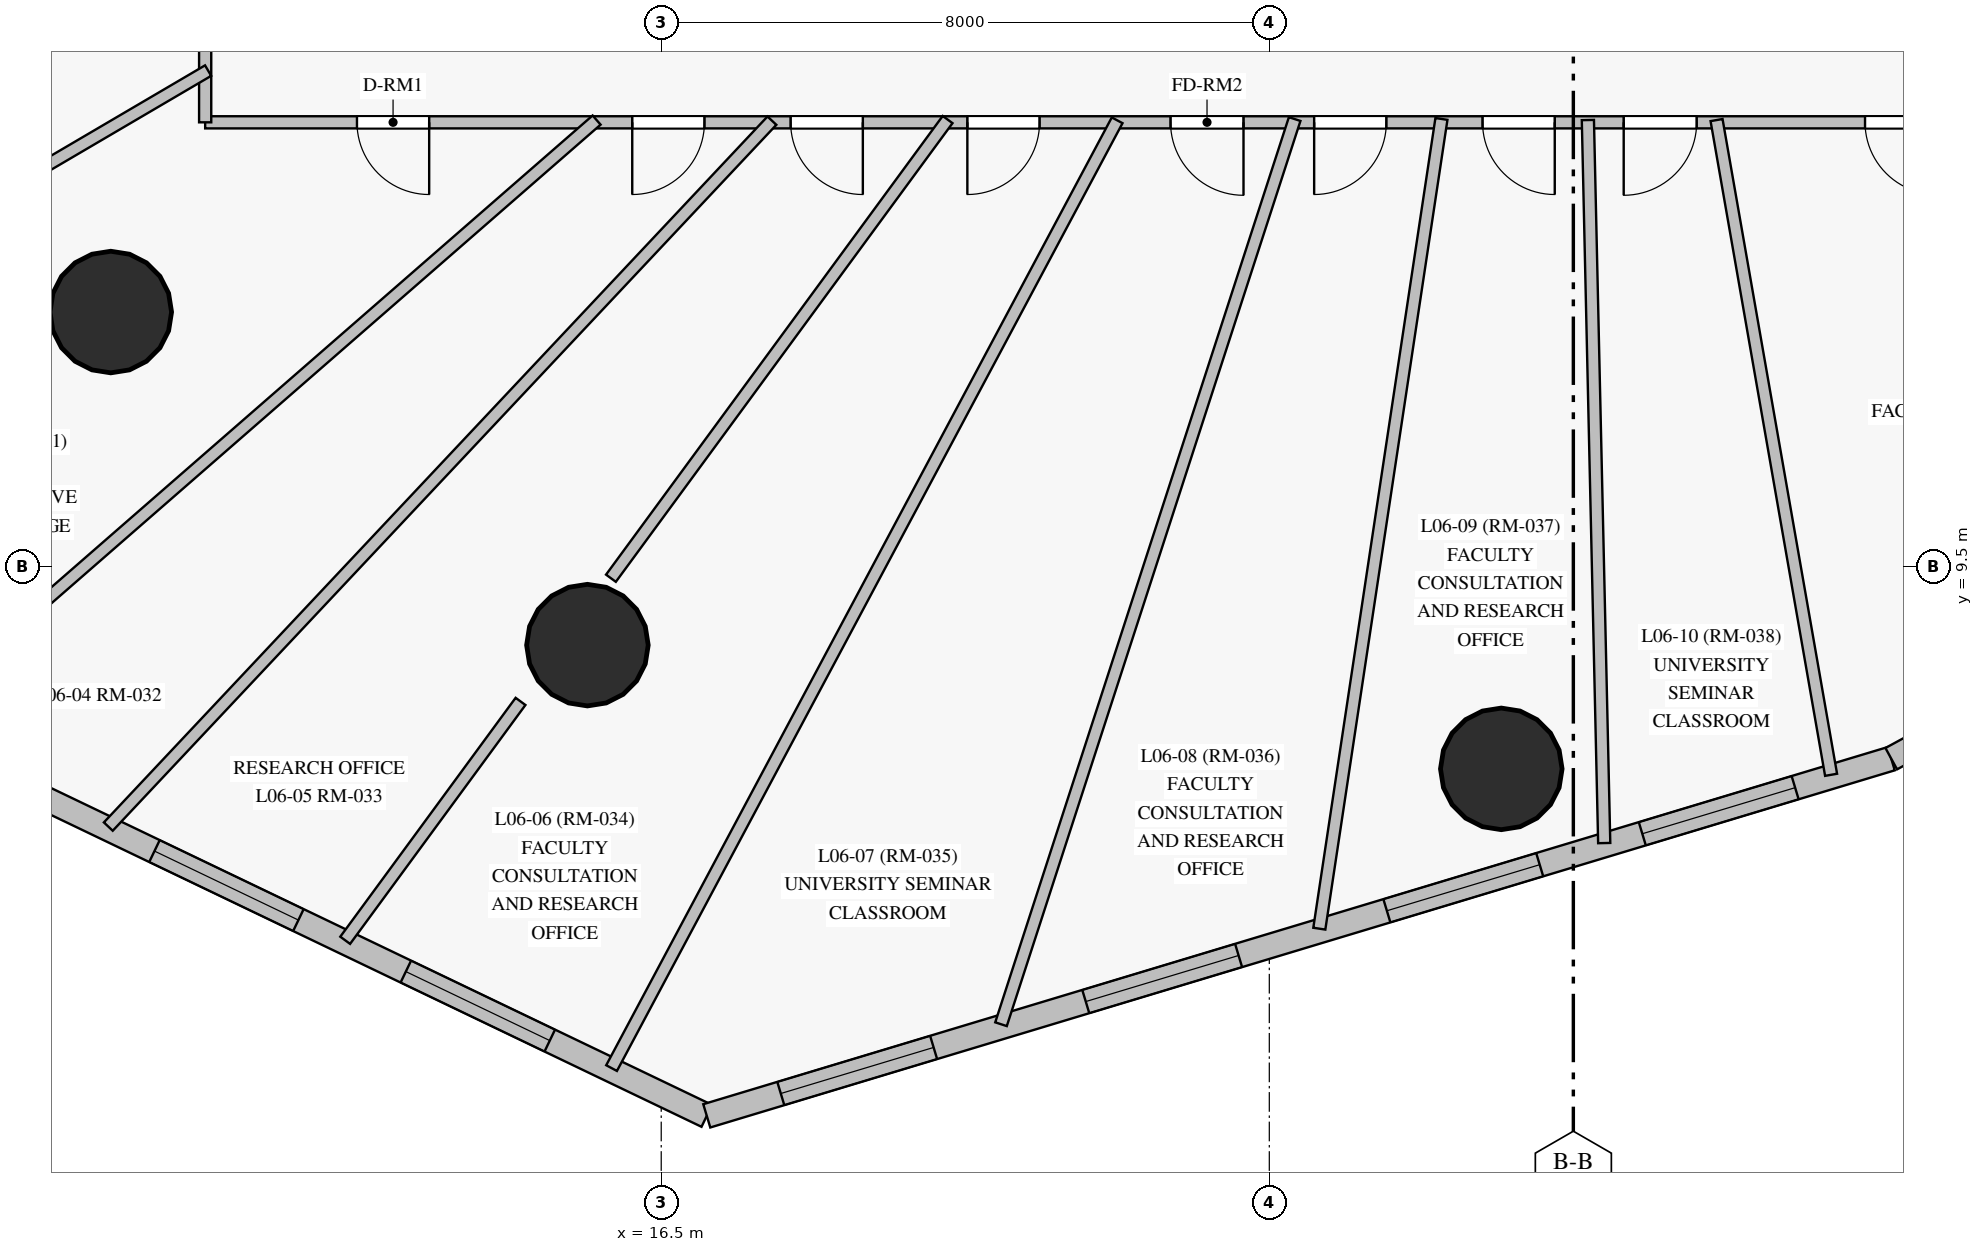
"""IFC4 building model, lengths in metres.
Left out: names, types, materials, properties, quantities, classifications, styles, units other than length and angle.
Written with IfcOpenShell. Run it as: python <this file> out.ifc"""

import sys

from ifc_helpers import new_model, si_unit, direction, frame, frame_2d, origin, origin_with_axes, origin_2d, place, context, subcontext, project, spatial, rectangle, circle, extrude, source, transform, mapped, element, fill, save


model = new_model("IFC4")
c1 = context("Model", 3, precision=1e-05, world=origin(), true_north=direction((0.0, 1.0)))
c2 = subcontext(c1, "Body", "Model", "MODEL_VIEW")
j1 = project(units=[si_unit("LENGTHUNIT", "METRE"), si_unit("PLANEANGLEUNIT", "RADIAN")], contexts=[c1])
p1 = place(None, origin())
s1 = spatial("IfcSite", under=j1, at=p1, CompositionType="ELEMENT")
p2 = place(p1, origin())
s2 = spatial("IfcBuilding", under=s1, at=p2, CompositionType="ELEMENT")
p3 = place(p2, frame((0.0, 0.0, 26.5)))
s3 = spatial("IfcBuildingStorey", under=s2, at=p3, CompositionType="ELEMENT", Elevation=26.5)
m1 = source(origin_with_axes(), c2, "Body", "SweptSolid", [
    extrude(circle(Radius=0.8, at=origin_2d()), origin(), (0.0, 0.0, 1.0), 3.6),
])
for number, where, z_axis, x_axis in (
    (1, (9.258, 12.854, 0.0), (0.0, 0.0, 1.0), (1.0, 0.0, 0.0)),
    (2, (15.529, 8.472, 0.0), (0.0, 0.0, 1.0), (1.0, 0.0, 0.0)),
    (3, (27.552, 6.844, 0.0), (0.0, 0.0, 1.0), (1.0, 0.0, 0.0)),
):
    element("IfcColumn", number, at=place(p3, frame(where, z_axis=z_axis, x_axis=x_axis)), inside=s3, PredefinedType="COLUMN", context=c2, shape_type="MappedRepresentation", body=[
        mapped(m1, transform((0.0, 0.0, 0.0), scale=1.0)),
    ])
p4 = place(p3, frame((7.334, 6.961, 0.0), z_axis=(0.0, 0.0, 1.0), x_axis=(0.901738594253, -0.432281745664, 0.0)))
e4 = element("IfcWall", 4, at=p4, inside=s3, PredefinedType="SOLIDWALL", context=c2, shape_type="SweptSolid", body=[
    extrude(rectangle(XDim=10.83, YDim=0.32, at=frame_2d((5.415, 0.0))), origin(), (0.0, 0.0, 1.0), 3.35),
])
p5 = place(p4, frame((2.771, 0.0, 0.85)))
e5 = element("IfcOpeningElement", 5, at=p5, cuts=e4, PredefinedType="OPENING", context=c2, shape_type="SweptSolid", body=[
    extrude(rectangle(XDim=2.1, YDim=1.95, at=frame_2d((1.05, 0.975))), frame((0.0, 0.17, 0.0), z_axis=(0.0, -1.0, 0.0), x_axis=(1.0, 0.0, 0.0)), (0.0, 0.0, 1.0), 0.34),
])
p6 = place(p4, frame((6.439, 0.0, 0.85)))
e6 = element("IfcOpeningElement", 6, at=p6, cuts=e4, PredefinedType="OPENING", context=c2, shape_type="SweptSolid", body=[
    extrude(rectangle(XDim=2.1, YDim=1.95, at=frame_2d((1.05, 0.975))), frame((0.0, 0.17, 0.0), z_axis=(0.0, -1.0, 0.0), x_axis=(1.0, 0.0, 0.0)), (0.0, 0.0, 1.0), 0.34),
])
p7 = place(p3, frame((17.099, 2.279, 0.0), z_axis=(0.0, 0.0, 1.0), x_axis=(0.957423656835, 0.288686579759, 0.0)))
e7 = element("IfcWall", 7, at=p7, inside=s3, PredefinedType="SOLIDWALL", context=c2, shape_type="SweptSolid", body=[
    extrude(rectangle(XDim=16.276, YDim=0.32, at=frame_2d((8.138, 0.0))), origin(), (0.0, 0.0, 1.0), 3.35),
])
p8 = place(p7, frame((1.017, 0.0, 0.85)))
e8 = element("IfcOpeningElement", 8, at=p8, cuts=e7, PredefinedType="OPENING", context=c2, shape_type="SweptSolid", body=[
    extrude(rectangle(XDim=2.1, YDim=1.95, at=frame_2d((1.05, 0.975))), frame((0.0, 0.17, 0.0), z_axis=(0.0, -1.0, 0.0), x_axis=(1.0, 0.0, 0.0)), (0.0, 0.0, 1.0), 0.34),
])
p9 = place(p7, frame((5.208, 0.0, 0.85)))
e9 = element("IfcOpeningElement", 9, at=p9, cuts=e7, PredefinedType="OPENING", context=c2, shape_type="SweptSolid", body=[
    extrude(rectangle(XDim=2.1, YDim=1.95, at=frame_2d((1.05, 0.975))), frame((0.0, 0.17, 0.0), z_axis=(0.0, -1.0, 0.0), x_axis=(1.0, 0.0, 0.0)), (0.0, 0.0, 1.0), 0.34),
])
p10 = place(p7, frame((9.345, 0.0, 0.85)))
e10 = element("IfcOpeningElement", 10, at=p10, cuts=e7, PredefinedType="OPENING", context=c2, shape_type="SweptSolid", body=[
    extrude(rectangle(XDim=2.1, YDim=1.95, at=frame_2d((1.05, 0.975))), frame((0.0, 0.17, 0.0), z_axis=(0.0, -1.0, 0.0), x_axis=(1.0, 0.0, 0.0)), (0.0, 0.0, 1.0), 0.34),
])
p11 = place(p7, frame((12.855, 0.0, 0.85)))
e11 = element("IfcOpeningElement", 11, at=p11, cuts=e7, PredefinedType="OPENING", context=c2, shape_type="SweptSolid", body=[
    extrude(rectangle(XDim=2.1, YDim=1.95, at=frame_2d((1.05, 0.975))), frame((0.0, 0.17, 0.0), z_axis=(0.0, -1.0, 0.0), x_axis=(1.0, 0.0, 0.0)), (0.0, 0.0, 1.0), 0.34),
])
p12 = place(p3, frame((32.683, 6.978, 0.0), z_axis=(0.0, 0.0, 1.0), x_axis=(0.878311519502, 0.478088772833, 0.0)))
e12 = element("IfcWall", 12, at=p12, inside=s3, PredefinedType="SOLIDWALL", context=c2, shape_type="SweptSolid", body=[
    extrude(rectangle(XDim=11.319, YDim=0.32, at=frame_2d((5.659, 0.0))), origin(), (0.0, 0.0, 1.0), 3.35),
])
p13 = place(p12, frame((1.178, 0.0, 0.85)))
e13 = element("IfcOpeningElement", 13, at=p13, cuts=e12, PredefinedType="OPENING", context=c2, shape_type="SweptSolid", body=[
    extrude(rectangle(XDim=2.1, YDim=1.95, at=frame_2d((1.05, 0.975))), frame((0.0, 0.17, 0.0), z_axis=(0.0, -1.0, 0.0), x_axis=(1.0, 0.0, 0.0)), (0.0, 0.0, 1.0), 0.34),
])
p14 = place(p12, frame((4.874, 0.0, 0.85)))
e14 = element("IfcOpeningElement", 14, at=p14, cuts=e12, PredefinedType="OPENING", context=c2, shape_type="SweptSolid", body=[
    extrude(rectangle(XDim=2.1, YDim=1.95, at=frame_2d((1.05, 0.975))), frame((0.0, 0.17, 0.0), z_axis=(0.0, -1.0, 0.0), x_axis=(1.0, 0.0, 0.0)), (0.0, 0.0, 1.0), 0.34),
])
p15 = place(p12, frame((8.625, 0.0, 0.85)))
e15 = element("IfcOpeningElement", 15, at=p15, cuts=e12, PredefinedType="OPENING", context=c2, shape_type="SweptSolid", body=[
    extrude(rectangle(XDim=2.1, YDim=1.95, at=frame_2d((1.05, 0.975))), frame((0.0, 0.17, 0.0), z_axis=(0.0, -1.0, 0.0), x_axis=(1.0, 0.0, 0.0)), (0.0, 0.0, 1.0), 0.34),
])
p16 = place(p3, frame((40.25, 15.35, 0.0), z_axis=(0.0, 0.0, 1.0), x_axis=(-1.0, 0.0, 0.0)))
e16 = element("IfcWall", 16, at=p16, inside=s3, PredefinedType="PARTITIONING", context=c2, shape_type="SweptSolid", body=[
    extrude(rectangle(XDim=29.75, YDim=0.16, at=frame_2d((14.875, 0.0))), origin(), (0.0, 0.0, 1.0), 2.7),
])
p17 = place(p16, frame((26.803, 0.0, 0.0)))
e17 = element("IfcOpeningElement", 17, at=p17, cuts=e16, PredefinedType="OPENING", context=c2, shape_type="SweptSolid", body=[
    extrude(rectangle(XDim=0.95, YDim=2.15, at=frame_2d((0.475, 1.075))), frame((0.0, 0.09, 0.0), z_axis=(0.0, -1.0, 0.0), x_axis=(1.0, 0.0, 0.0)), (0.0, 0.0, 1.0), 0.18),
])
p18 = place(p16, frame((23.181, 0.0, 0.0)))
e18 = element("IfcOpeningElement", 18, at=p18, cuts=e16, PredefinedType="OPENING", context=c2, shape_type="SweptSolid", body=[
    extrude(rectangle(XDim=0.95, YDim=2.15, at=frame_2d((0.475, 1.075))), frame((0.0, 0.09, 0.0), z_axis=(0.0, -1.0, 0.0), x_axis=(1.0, 0.0, 0.0)), (0.0, 0.0, 1.0), 0.18),
])
p19 = place(p16, frame((21.097, 0.0, 0.0)))
e19 = element("IfcOpeningElement", 19, at=p19, cuts=e16, PredefinedType="OPENING", context=c2, shape_type="SweptSolid", body=[
    extrude(rectangle(XDim=0.95, YDim=2.15, at=frame_2d((0.475, 1.075))), frame((0.0, 0.09, 0.0), z_axis=(0.0, -1.0, 0.0), x_axis=(1.0, 0.0, 0.0)), (0.0, 0.0, 1.0), 0.18),
])
p20 = place(p16, frame((18.772, 0.0, 0.0)))
e20 = element("IfcOpeningElement", 20, at=p20, cuts=e16, PredefinedType="OPENING", context=c2, shape_type="SweptSolid", body=[
    extrude(rectangle(XDim=0.95, YDim=2.15, at=frame_2d((0.475, 1.075))), frame((0.0, 0.09, 0.0), z_axis=(0.0, -1.0, 0.0), x_axis=(1.0, 0.0, 0.0)), (0.0, 0.0, 1.0), 0.18),
])
p21 = place(p16, frame((16.089, 0.0, 0.0)))
e21 = element("IfcOpeningElement", 21, at=p21, cuts=e16, PredefinedType="OPENING", context=c2, shape_type="SweptSolid", body=[
    extrude(rectangle(XDim=0.96, YDim=2.15, at=frame_2d((0.48, 1.075))), frame((0.0, 0.09, 0.0), z_axis=(0.0, -1.0, 0.0), x_axis=(1.0, 0.0, 0.0)), (0.0, 0.0, 1.0), 0.18),
])
p22 = place(p16, frame((14.21, 0.0, 0.0)))
e22 = element("IfcOpeningElement", 22, at=p22, cuts=e16, PredefinedType="OPENING", context=c2, shape_type="SweptSolid", body=[
    extrude(rectangle(XDim=0.95, YDim=2.15, at=frame_2d((0.475, 1.075))), frame((0.0, 0.09, 0.0), z_axis=(0.0, -1.0, 0.0), x_axis=(1.0, 0.0, 0.0)), (0.0, 0.0, 1.0), 0.18),
])
p23 = place(p16, frame((11.995, 0.0, 0.0)))
e23 = element("IfcOpeningElement", 23, at=p23, cuts=e16, PredefinedType="OPENING", context=c2, shape_type="SweptSolid", body=[
    extrude(rectangle(XDim=0.95, YDim=2.15, at=frame_2d((0.475, 1.075))), frame((0.0, 0.09, 0.0), z_axis=(0.0, -1.0, 0.0), x_axis=(1.0, 0.0, 0.0)), (0.0, 0.0, 1.0), 0.18),
])
p24 = place(p16, frame((10.127, 0.0, 0.0)))
e24 = element("IfcOpeningElement", 24, at=p24, cuts=e16, PredefinedType="OPENING", context=c2, shape_type="SweptSolid", body=[
    extrude(rectangle(XDim=0.96, YDim=2.15, at=frame_2d((0.48, 1.075))), frame((0.0, 0.09, 0.0), z_axis=(0.0, -1.0, 0.0), x_axis=(1.0, 0.0, 0.0)), (0.0, 0.0, 1.0), 0.18),
])
p25 = place(p16, frame((6.962, 0.0, 0.0)))
e25 = element("IfcOpeningElement", 25, at=p25, cuts=e16, PredefinedType="OPENING", context=c2, shape_type="SweptSolid", body=[
    extrude(rectangle(XDim=0.95, YDim=2.15, at=frame_2d((0.475, 1.075))), frame((0.0, 0.09, 0.0), z_axis=(0.0, -1.0, 0.0), x_axis=(1.0, 0.0, 0.0)), (0.0, 0.0, 1.0), 0.18),
])
p26 = place(p16, frame((1.325, 0.0, 0.0)))
e26 = element("IfcOpeningElement", 26, at=p26, cuts=e16, PredefinedType="OPENING", context=c2, shape_type="SweptSolid", body=[
    extrude(rectangle(XDim=0.95, YDim=2.15, at=frame_2d((0.475, 1.075))), frame((0.0, 0.09, 0.0), z_axis=(0.0, -1.0, 0.0), x_axis=(1.0, 0.0, 0.0)), (0.0, 0.0, 1.0), 0.18),
])
p27 = place(p3, frame((10.5, 15.35, 0.0), z_axis=(0.0, 0.0, 1.0), x_axis=(0.0, 1.0, 0.0)))
e27 = element("IfcWall", 27, at=p27, inside=s3, PredefinedType="PARTITIONING", context=c2, shape_type="SweptSolid", body=[
    extrude(rectangle(XDim=22.3, YDim=0.16, at=frame_2d((11.15, 0.0))), origin(), (0.0, 0.0, 1.0), 2.75),
])
p28 = place(p27, frame((7.33, 0.0, 0.0)))
e28 = element("IfcOpeningElement", 28, at=p28, cuts=e27, PredefinedType="OPENING", context=c2, shape_type="SweptSolid", body=[
    extrude(rectangle(XDim=0.95, YDim=2.15, at=frame_2d((0.475, 1.075))), frame((0.0, 0.09, 0.0), z_axis=(0.0, -1.0, 0.0), x_axis=(1.0, 0.0, 0.0)), (0.0, 0.0, 1.0), 0.18),
])
p29 = place(p27, frame((5.1, 0.0, 0.0)))
e29 = element("IfcOpeningElement", 29, at=p29, cuts=e27, PredefinedType="OPENING", context=c2, shape_type="SweptSolid", body=[
    extrude(rectangle(XDim=0.96, YDim=2.15, at=frame_2d((0.48, 1.075))), frame((0.0, 0.09, 0.0), z_axis=(0.0, -1.0, 0.0), x_axis=(1.0, 0.0, 0.0)), (0.0, 0.0, 1.0), 0.18),
])
p30 = place(p27, frame((14.61, 0.0, 0.0)))
e30 = element("IfcOpeningElement", 30, at=p30, cuts=e27, PredefinedType="OPENING", context=c2, shape_type="SweptSolid", body=[
    extrude(rectangle(XDim=0.96, YDim=2.15, at=frame_2d((0.48, 1.075))), frame((0.0, 0.09, 0.0), z_axis=(0.0, -1.0, 0.0), x_axis=(1.0, 0.0, 0.0)), (0.0, 0.0, 1.0), 0.18),
])
p31 = place(p27, frame((10.675, 0.0, 0.0)))
e31 = element("IfcOpeningElement", 31, at=p31, cuts=e27, PredefinedType="OPENING", context=c2, shape_type="SweptSolid", body=[
    extrude(rectangle(XDim=0.95, YDim=2.15, at=frame_2d((0.475, 1.075))), frame((0.0, 0.09, 0.0), z_axis=(0.0, -1.0, 0.0), x_axis=(1.0, 0.0, 0.0)), (0.0, 0.0, 1.0), 0.18),
])
p32 = place(p3, frame((22.498, 15.376, 0.0), z_axis=(0.0, 0.0, 1.0), x_axis=(-0.470669828434, -0.882309419989, 0.0)))
e32 = element("IfcWall", 32, at=p32, inside=s3, PredefinedType="PARTITIONING", context=c2, shape_type="SweptSolid", body=[
    extrude(rectangle(XDim=14.132, YDim=0.16, at=frame_2d((7.066, 0.0))), origin(), (0.0, 0.0, 1.0), 3.35),
])
p33 = place(p3, frame((17.956, 15.372, 0.0), z_axis=(0.0, 0.0, 1.0), x_axis=(-0.684954139438, -0.728586183554, 0.0)))
e33 = element("IfcWall", 33, at=p33, inside=s3, PredefinedType="PARTITIONING", context=c2, shape_type="SweptSolid", body=[
    extrude(rectangle(XDim=12.746, YDim=0.16, at=frame_2d((6.373, 0.0))), origin(), (0.0, 0.0, 1.0), 2.7),
])
p34 = place(p3, frame((24.833, 15.393, 0.0), z_axis=(0.0, 0.0, 1.0), x_axis=(-0.308570986653, -0.951201317386, 0.0)))
e34 = element("IfcWall", 34, at=p34, inside=s3, PredefinedType="PARTITIONING", context=c2, shape_type="SweptSolid", body=[
    extrude(rectangle(XDim=12.519, YDim=0.16, at=frame_2d((6.26, 0.0))), origin(), (0.0, 0.0, 1.0), 3.35),
])
p35 = place(p3, frame((15.65, 15.38, 0.0), z_axis=(0.0, 0.0, 1.0), x_axis=(-0.753853018897, -0.657043092879, 0.0)))
e35 = element("IfcWall", 35, at=p35, inside=s3, PredefinedType="PARTITIONING", context=c2, shape_type="SweptSolid", body=[
    extrude(rectangle(XDim=11.469, YDim=0.16, at=frame_2d((5.735, 0.0))), origin(), (0.0, 0.0, 1.0), 3.35),
])
p36 = place(p3, frame((26.764, 15.395, 0.0), z_axis=(0.0, 0.0, 1.0), x_axis=(-0.149113896904, -0.988820026977, 0.0)))
e36 = element("IfcWall", 36, at=p36, inside=s3, PredefinedType="PARTITIONING", context=c2, shape_type="SweptSolid", body=[
    extrude(rectangle(XDim=10.773, YDim=0.16, at=frame_2d((5.387, 0.0))), origin(), (0.0, 0.0, 1.0), 2.7),
])
p37 = place(p3, frame((28.691, 15.38, 0.0), z_axis=(0.0, 0.0, 1.0), x_axis=(0.022580930061, -0.999745018291, 0.0)))
e37 = element("IfcWall", 37, at=p37, inside=s3, PredefinedType="PARTITIONING", context=c2, shape_type="SweptSolid", body=[
    extrude(rectangle(XDim=9.514, YDim=0.16, at=frame_2d((4.757, 0.0))), origin(), (0.0, 0.0, 1.0), 3.35),
])
p38 = place(p3, frame((30.384, 15.38, 0.0), z_axis=(0.0, 0.0, 1.0), x_axis=(0.172289580818, -0.985046344261, 0.0)))
e38 = element("IfcWall", 38, at=p38, inside=s3, PredefinedType="PARTITIONING", context=c2, shape_type="SweptSolid", body=[
    extrude(rectangle(XDim=8.745, YDim=0.16, at=frame_2d((4.372, 0.0))), origin(), (0.0, 0.0, 1.0), 3.35),
])
p39 = place(p3, frame((20.268, 15.386, 0.0), z_axis=(0.0, 0.0, 1.0), x_axis=(-0.591743955509, -0.806125977201, 0.0)))
e39 = element("IfcWall", 39, at=p39, inside=s3, PredefinedType="PARTITIONING", context=c2, shape_type="SweptSolid", body=[
    extrude(rectangle(XDim=7.485, YDim=0.16, at=frame_2d((3.743, 0.0))), origin(), (0.0, 0.0, 1.0), 2.7),
])
p40 = place(p3, frame((10.539, 16.031, 0.0), z_axis=(0.0, 0.0, 1.0), x_axis=(-0.862473711585, -0.50610186408, 0.0)))
e40 = element("IfcWall", 40, at=p40, inside=s3, PredefinedType="PARTITIONING", context=c2, shape_type="SweptSolid", body=[
    extrude(rectangle(XDim=6.439, YDim=0.16, at=frame_2d((3.219, 0.0))), origin(), (0.0, 0.0, 1.0), 3.35),
])
p41 = place(p3, frame((14.649, 7.731, 0.0), z_axis=(0.0, 0.0, 1.0), x_axis=(-0.591711140864, -0.806150064056, 0.0)))
e41 = element("IfcWall", 41, at=p41, inside=s3, PredefinedType="PARTITIONING", context=c2, shape_type="SweptSolid", body=[
    extrude(rectangle(XDim=3.898, YDim=0.16, at=frame_2d((1.949, 0.0))), origin(), (0.0, 0.0, 1.0), 3.35),
])
m2 = source(origin_with_axes(), c2, "Body", "SweptSolid", [
    extrude(rectangle(XDim=2.1, YDim=1.95, at=frame_2d((1.05, 0.975))), frame((0.0, 0.03, 0.0), z_axis=(0.0, -1.0, 0.0), x_axis=(1.0, 0.0, 0.0)), (0.0, 0.0, 1.0), 0.06),
])
p42 = place(p5, origin())
e42 = element("IfcWindow", 42, at=p42, inside=s3, PartitioningType="SINGLE_PANEL", PredefinedType="WINDOW", context=c2, shape_type="MappedRepresentation", body=[
    mapped(m2, transform((0.0, 0.0, 0.0), scale=1.0)),
])
fill(e5, e42)
p43 = place(p6, origin())
e43 = element("IfcWindow", 43, at=p43, inside=s3, PartitioningType="SINGLE_PANEL", PredefinedType="WINDOW", context=c2, shape_type="MappedRepresentation", body=[
    mapped(m2, transform((0.0, 0.0, 0.0), scale=1.0)),
])
fill(e6, e43)
p44 = place(p8, origin())
e44 = element("IfcWindow", 44, at=p44, inside=s3, PartitioningType="SINGLE_PANEL", PredefinedType="WINDOW", context=c2, shape_type="MappedRepresentation", body=[
    mapped(m2, transform((0.0, 0.0, 0.0), scale=1.0)),
])
fill(e8, e44)
p45 = place(p9, origin())
e45 = element("IfcWindow", 45, at=p45, inside=s3, PartitioningType="SINGLE_PANEL", PredefinedType="WINDOW", context=c2, shape_type="MappedRepresentation", body=[
    mapped(m2, transform((0.0, 0.0, 0.0), scale=1.0)),
])
fill(e9, e45)
p46 = place(p10, origin())
e46 = element("IfcWindow", 46, at=p46, inside=s3, PartitioningType="SINGLE_PANEL", PredefinedType="WINDOW", context=c2, shape_type="MappedRepresentation", body=[
    mapped(m2, transform((0.0, 0.0, 0.0), scale=1.0)),
])
fill(e10, e46)
p47 = place(p11, origin())
e47 = element("IfcWindow", 47, at=p47, inside=s3, PartitioningType="SINGLE_PANEL", PredefinedType="WINDOW", context=c2, shape_type="MappedRepresentation", body=[
    mapped(m2, transform((0.0, 0.0, 0.0), scale=1.0)),
])
fill(e11, e47)
m3 = source(origin_with_axes(), c2, "Body", "SweptSolid", [
    extrude(rectangle(XDim=0.95, YDim=2.15, at=frame_2d((0.475, 1.075))), frame((0.0, 0.025, 0.0), z_axis=(0.0, -1.0, 0.0), x_axis=(1.0, 0.0, 0.0)), (0.0, 0.0, 1.0), 0.05),
])
p48 = place(p17, origin())
e48 = element("IfcDoor", 48, at=p48, inside=s3, OperationType="SINGLE_SWING_LEFT", PredefinedType="DOOR", context=c2, shape_type="MappedRepresentation", body=[
    mapped(m3, transform((0.0, 0.0, 0.0), scale=1.0)),
])
fill(e17, e48)
p49 = place(p18, origin())
e49 = element("IfcDoor", 49, at=p49, inside=s3, OperationType="SINGLE_SWING_RIGHT", PredefinedType="DOOR", context=c2, shape_type="MappedRepresentation", body=[
    mapped(m3, transform((0.0, 0.0, 0.0), scale=1.0)),
])
fill(e18, e49)
p50 = place(p19, origin())
e50 = element("IfcDoor", 50, at=p50, inside=s3, OperationType="SINGLE_SWING_LEFT", PredefinedType="DOOR", context=c2, shape_type="MappedRepresentation", body=[
    mapped(m3, transform((0.0, 0.0, 0.0), scale=1.0)),
])
fill(e19, e50)
p51 = place(p20, origin())
e51 = element("IfcDoor", 51, at=p51, inside=s3, OperationType="SINGLE_SWING_RIGHT", PredefinedType="DOOR", context=c2, shape_type="MappedRepresentation", body=[
    mapped(m3, transform((0.0, 0.0, 0.0), scale=1.0)),
])
fill(e20, e51)
m4 = source(origin_with_axes(), c2, "Body", "SweptSolid", [
    extrude(rectangle(XDim=0.96, YDim=2.15, at=frame_2d((0.48, 1.075))), frame((0.0, 0.025, 0.0), z_axis=(0.0, -1.0, 0.0), x_axis=(1.0, 0.0, 0.0)), (0.0, 0.0, 1.0), 0.05),
])
p52 = place(p21, origin())
e52 = element("IfcDoor", 52, at=p52, inside=s3, OperationType="SINGLE_SWING_LEFT", PredefinedType="DOOR", context=c2, shape_type="MappedRepresentation", body=[
    mapped(m4, transform((0.0, 0.0, 0.0), scale=1.0)),
])
fill(e21, e52)
p53 = place(p22, origin())
e53 = element("IfcDoor", 53, at=p53, inside=s3, OperationType="SINGLE_SWING_RIGHT", PredefinedType="DOOR", context=c2, shape_type="MappedRepresentation", body=[
    mapped(m3, transform((0.0, 0.0, 0.0), scale=1.0)),
])
fill(e22, e53)
p54 = place(p23, origin())
e54 = element("IfcDoor", 54, at=p54, inside=s3, OperationType="SINGLE_SWING_LEFT", PredefinedType="DOOR", context=c2, shape_type="MappedRepresentation", body=[
    mapped(m3, transform((0.0, 0.0, 0.0), scale=1.0)),
])
fill(e23, e54)
p55 = place(p24, origin())
e55 = element("IfcDoor", 55, at=p55, inside=s3, OperationType="SINGLE_SWING_RIGHT", PredefinedType="DOOR", context=c2, shape_type="MappedRepresentation", body=[
    mapped(m4, transform((0.0, 0.0, 0.0), scale=1.0)),
])
fill(e24, e55)
p56 = place(p25, origin())
e56 = element("IfcDoor", 56, at=p56, inside=s3, OperationType="SINGLE_SWING_LEFT", PredefinedType="DOOR", context=c2, shape_type="MappedRepresentation", body=[
    mapped(m3, transform((0.0, 0.0, 0.0), scale=1.0)),
])
fill(e25, e56)
save(model, sys.argv[1])
